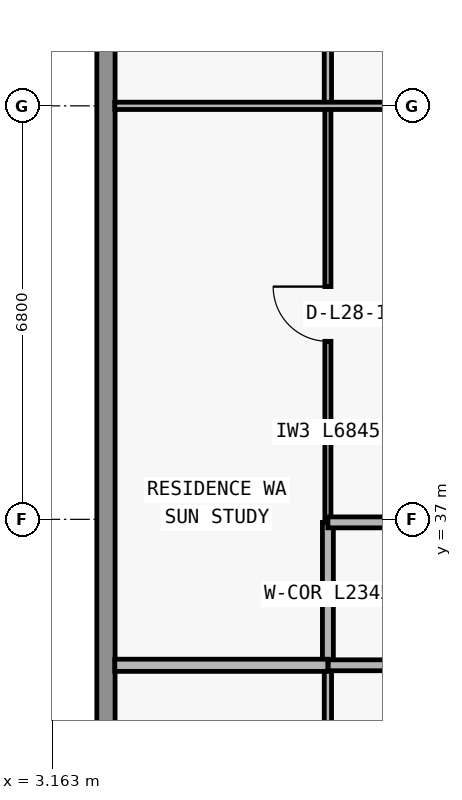
"""IFC4 building model, lengths in metres.
Left out: names, types, materials, properties, quantities, classifications, styles, units other than length and angle.
Written with IfcOpenShell. Run it as: python <this file> out.ifc"""

import sys

from ifc_helpers import new_model, si_unit, direction, frame, frame_2d, origin, place, context, subcontext, project, spatial, rectangle, extrude, element, fill, save


model = new_model("IFC4")
c1 = context("Model", 3, precision=1e-05, world=origin(), true_north=direction((0.0, 1.0)))
c2 = subcontext(c1, "Body", "Model", "MODEL_VIEW")
j1 = project(units=[si_unit("LENGTHUNIT", "METRE"), si_unit("PLANEANGLEUNIT", "RADIAN")], contexts=[c1])
p1 = place(None, origin())
s1 = spatial("IfcSite", under=j1, at=p1, CompositionType="ELEMENT")
p2 = place(p1, origin())
s2 = spatial("IfcBuilding", under=s1, at=p2, CompositionType="ELEMENT")
p3 = place(p2, frame((0.0, 0.0, 105.9)))
s3 = spatial("IfcBuildingStorey", under=s2, at=p3, CompositionType="ELEMENT", Elevation=105.9)
p4 = place(p3, frame((4.05, 28.0, 0.0), z_axis=(0.0, 0.0, 1.0), x_axis=(0.0, 1.0, 0.0)))
e1 = element("IfcWall", 1, at=p4, inside=s3, PredefinedType="STANDARD", context=c2, shape_type="SweptSolid", body=[
    extrude(rectangle(XDim=19.2, YDim=0.3, at=frame_2d((9.6, 0.0))), origin(), (0.0, 0.0, 1.0), 3.05),
])
p5 = place(p3, frame((7.7, 30.24, 0.0), z_axis=(0.0, 0.0, 1.0), x_axis=(0.0, 1.0, 0.0)))
e2 = element("IfcWall", 2, at=p5, inside=s3, PredefinedType="PARTITIONING", context=c2, shape_type="SweptSolid", body=[
    extrude(rectangle(XDim=4.36, YDim=0.12, at=frame_2d((2.18, 0.0))), origin(), (0.0, 0.0, 1.0), 3.05),
])
p6 = place(p3, frame((7.7, 34.605, 0.0), z_axis=(0.0, 0.0, 1.0), x_axis=(0.0, 1.0, 0.0)))
e3 = element("IfcWall", 3, at=p6, inside=s3, PredefinedType="PARTITIONING", context=c2, shape_type="SweptSolid", body=[
    extrude(rectangle(XDim=2.345, YDim=0.18, at=frame_2d((1.172, 0.0))), origin(), (0.0, 0.0, 1.0), 3.05),
])
p7 = place(p3, frame((7.7, 36.955, 0.0), z_axis=(0.0, 0.0, 1.0), x_axis=(0.0, 1.0, 0.0)))
e4 = element("IfcWall", 4, at=p7, inside=s3, PredefinedType="MOVABLE", context=c2, shape_type="SweptSolid", body=[
    extrude(rectangle(XDim=6.845, YDim=0.1, at=frame_2d((3.422, 0.0))), origin(), (0.0, 0.0, 1.0), 3.05),
])
p8 = place(p7, frame((2.972, 0.0, 0.0)))
e5 = element("IfcOpeningElement", 5, at=p8, cuts=e4, PredefinedType="OPENING", context=c2, shape_type="SweptSolid", body=[
    extrude(rectangle(XDim=0.9, YDim=2.15, at=frame_2d((0.45, 1.075))), frame((0.0, 0.06, 0.0), z_axis=(0.0, -1.0, 0.0), x_axis=(1.0, 0.0, 0.0)), (0.0, 0.0, 1.0), 0.12),
])
p9 = place(p3, frame((7.7, 43.805, 0.0), z_axis=(0.0, 0.0, 1.0), x_axis=(0.0, 1.0, 0.0)))
e6 = element("IfcWall", 6, at=p9, inside=s3, PredefinedType="PARTITIONING", context=c2, shape_type="SweptSolid", body=[
    extrude(rectangle(XDim=3.275, YDim=0.12, at=frame_2d((1.638, 0.0))), origin(), (0.0, 0.0, 1.0), 3.05),
])
p10 = place(p9, frame((1.188, 0.0, 0.0)))
e7 = element("IfcOpeningElement", 7, at=p10, cuts=e6, PredefinedType="OPENING", context=c2, shape_type="SweptSolid", body=[
    extrude(rectangle(XDim=0.9, YDim=2.15, at=frame_2d((0.45, 1.075))), frame((0.0, 0.07, 0.0), z_axis=(0.0, -1.0, 0.0), x_axis=(1.0, 0.0, 0.0)), (0.0, 0.0, 1.0), 0.14),
])
p11 = place(p3, frame((4.195, 34.6, 0.0), z_axis=(0.0, 0.0, 1.0), x_axis=(1.0, 0.0, 0.0)))
e8 = element("IfcWall", 8, at=p11, inside=s3, PredefinedType="PARTITIONING", context=c2, shape_type="SweptSolid", body=[
    extrude(rectangle(XDim=3.505, YDim=0.2, at=frame_2d((1.752, 0.0))), origin(), (0.0, 0.0, 1.0), 3.05),
])
p12 = place(p3, frame((7.705, 34.6, 0.0), z_axis=(0.0, 0.0, 1.0), x_axis=(1.0, 0.0, 0.0)))
e9 = element("IfcWall", 9, at=p12, inside=s3, PredefinedType="PARTITIONING", context=c2, shape_type="SweptSolid", body=[
    extrude(rectangle(XDim=10.545, YDim=0.18, at=frame_2d((5.272, 0.0))), origin(), (0.0, 0.0, 1.0), 3.05),
])
p13 = place(p12, frame((4.714, 0.0, 0.0)))
e10 = element("IfcOpeningElement", 10, at=p13, cuts=e9, PredefinedType="OPENING", context=c2, shape_type="SweptSolid", body=[
    extrude(rectangle(XDim=1.0, YDim=2.2, at=frame_2d((0.5, 1.1))), frame((0.0, 0.1, 0.0), z_axis=(0.0, -1.0, 0.0), x_axis=(1.0, 0.0, 0.0)), (0.0, 0.0, 1.0), 0.2),
])
p14 = place(p3, frame((7.7, 36.95, 0.0), z_axis=(0.0, 0.0, 1.0), x_axis=(1.0, 0.0, 0.0)))
e11 = element("IfcWall", 11, at=p14, inside=s3, PredefinedType="PARTITIONING", context=c2, shape_type="SweptSolid", body=[
    extrude(rectangle(XDim=10.145, YDim=0.18, at=frame_2d((5.073, 0.0))), origin(), (0.0, 0.0, 1.0), 3.05),
])
p15 = place(p14, frame((5.188, 0.0, 0.0)))
e12 = element("IfcOpeningElement", 12, at=p15, cuts=e11, PredefinedType="OPENING", context=c2, shape_type="SweptSolid", body=[
    extrude(rectangle(XDim=1.0, YDim=2.2, at=frame_2d((0.5, 1.1))), frame((0.0, 0.1, 0.0), z_axis=(0.0, -1.0, 0.0), x_axis=(1.0, 0.0, 0.0)), (0.0, 0.0, 1.0), 0.2),
])
p16 = place(p3, frame((4.195, 43.8, 0.0), z_axis=(0.0, 0.0, 1.0), x_axis=(1.0, 0.0, 0.0)))
e13 = element("IfcWall", 13, at=p16, inside=s3, PredefinedType="PARTITIONING", context=c2, shape_type="SweptSolid", body=[
    extrude(rectangle(XDim=13.66, YDim=0.12, at=frame_2d((6.83, 0.0))), origin(), (0.0, 0.0, 1.0), 2.339),
])
p17 = place(p16, frame((8.743, 0.0, 0.0)))
e14 = element("IfcOpeningElement", 14, at=p17, cuts=e13, PredefinedType="OPENING", context=c2, shape_type="SweptSolid", body=[
    extrude(rectangle(XDim=0.9, YDim=2.15, at=frame_2d((0.45, 1.075))), frame((0.0, 0.07, 0.0), z_axis=(0.0, -1.0, 0.0), x_axis=(1.0, 0.0, 0.0)), (0.0, 0.0, 1.0), 0.14),
])
p18 = place(p16, frame((12.107, 0.0, 0.0)))
e15 = element("IfcOpeningElement", 15, at=p18, cuts=e13, PredefinedType="OPENING", context=c2, shape_type="SweptSolid", body=[
    extrude(rectangle(XDim=0.85, YDim=2.1, at=frame_2d((0.425, 1.05))), frame((0.0, 0.07, 0.0), z_axis=(0.0, -1.0, 0.0), x_axis=(1.0, 0.0, 0.0)), (0.0, 0.0, 1.0), 0.14),
])
p19 = place(p8, origin())
e16 = element("IfcDoor", 16, at=p19, inside=s3, OperationType="SINGLE_SWING_RIGHT", PredefinedType="DOOR", context=c2, shape_type="SweptSolid", body=[
    extrude(rectangle(XDim=0.9, YDim=2.15, at=frame_2d((0.45, 1.075))), frame((0.0, 0.025, 0.0), z_axis=(0.0, -1.0, 0.0), x_axis=(1.0, 0.0, 0.0)), (0.0, 0.0, 1.0), 0.05),
])
fill(e5, e16)
save(model, sys.argv[1])
